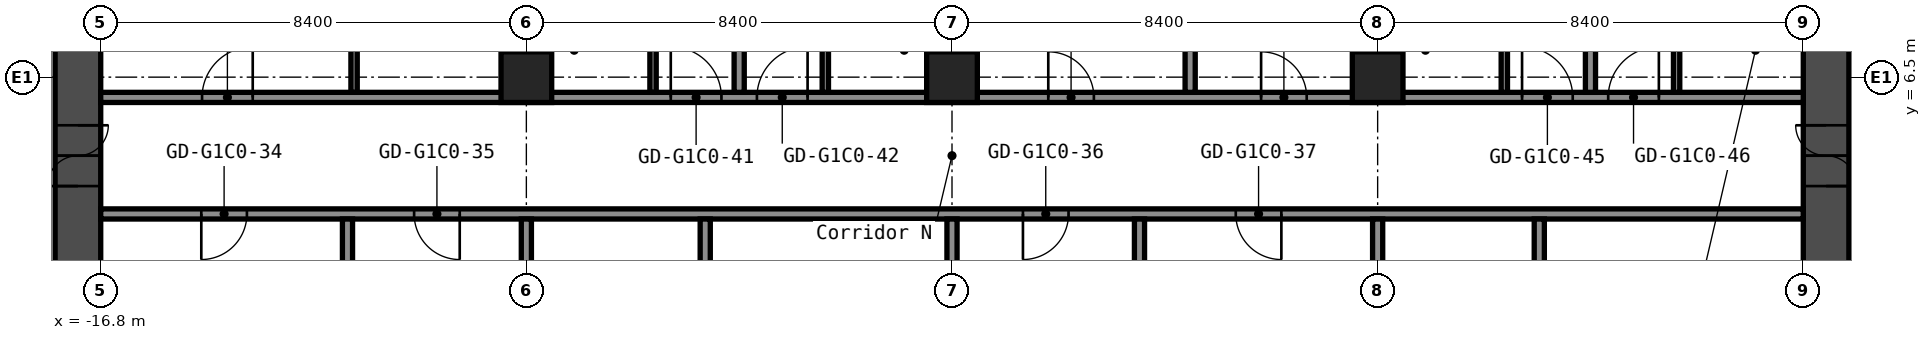
"""IFC4 building model, lengths in metres.
Left out: names, types, materials, properties, quantities, classifications, styles, units other than length and angle.
Written with IfcOpenShell. Run it as: python <this file> out.ifc"""

import sys

from ifc_helpers import new_model, si_unit, direction, frame, frame_2d, origin, origin_2d, place, context, subcontext, project, spatial, rectangle, hollow_rectangle, extrude, element, fill, save


model = new_model("IFC4")
c1 = context("Model", 3, precision=1e-05, world=origin(), true_north=direction((0.0, 1.0)))
c2 = subcontext(c1, "Body", "Model", "MODEL_VIEW")
j1 = project(units=[si_unit("LENGTHUNIT", "METRE"), si_unit("PLANEANGLEUNIT", "RADIAN")], contexts=[c1])
p1 = place(None, origin())
s1 = spatial("IfcSite", under=j1, at=p1, CompositionType="ELEMENT")
p2 = place(p1, origin())
s2 = spatial("IfcBuilding", under=s1, at=p2, CompositionType="ELEMENT")
p3 = place(p2, frame((0.0, 0.0, 26.2)))
s3 = spatial("IfcBuildingStorey", under=s2, at=p3, CompositionType="ELEMENT", Elevation=26.2)
for number, where, z_axis, x_axis in (
    (1, (-8.4, 6.5, 0.0), (0.0, 0.0, 1.0), (1.0, 0.0, 0.0)),
    (2, (0.0, 6.5, 0.0), (0.0, 0.0, 1.0), (1.0, 0.0, 0.0)),
    (3, (8.4, 6.5, 0.0), (0.0, 0.0, 1.0), (1.0, 0.0, 0.0)),
):
    element("IfcColumn", number, at=place(p3, frame(where, z_axis=z_axis, x_axis=x_axis)), inside=s3, PredefinedType="COLUMN", context=c2, shape_type="SweptSolid", body=[
        extrude(hollow_rectangle(XDim=1.0, YDim=1.0, WallThickness=0.04, at=origin_2d()), origin(), (0.0, 0.0, 1.0), 2.8),
    ])
p4 = place(p3, frame((-17.25, -8.4, 0.0), z_axis=(0.0, 0.0, 1.0), x_axis=(0.0, 1.0, 0.0)))
e4 = element("IfcWall", 4, at=p4, inside=s3, PredefinedType="SHEAR", context=c2, shape_type="SweptSolid", body=[
    extrude(rectangle(XDim=16.8, YDim=0.9, at=frame_2d((8.4, 0.0))), origin(), (0.0, 0.0, 1.0), 2.8),
])
p5 = place(p4, frame((12.75, 0.0, 0.0)))
e5 = element("IfcOpeningElement", 5, at=p5, cuts=e4, PredefinedType="OPENING", context=c2, shape_type="SweptSolid", body=[
    extrude(rectangle(XDim=1.2, YDim=2.1, at=frame_2d((0.6, 1.05))), frame((0.0, 0.46, 0.0), z_axis=(0.0, -1.0, 0.0), x_axis=(1.0, 0.0, 0.0)), (0.0, 0.0, 1.0), 0.92),
])
p6 = place(p4, frame((2.85, 0.0, 0.0)))
e6 = element("IfcOpeningElement", 6, at=p6, cuts=e4, PredefinedType="OPENING", context=c2, shape_type="SweptSolid", body=[
    extrude(rectangle(XDim=1.2, YDim=2.1, at=frame_2d((0.6, 1.05))), frame((0.0, 0.46, 0.0), z_axis=(0.0, -1.0, 0.0), x_axis=(1.0, 0.0, 0.0)), (0.0, 0.0, 1.0), 0.92),
])
p7 = place(p3, frame((17.25, -8.4, 0.0), z_axis=(0.0, 0.0, 1.0), x_axis=(0.0, 1.0, 0.0)))
e7 = element("IfcWall", 7, at=p7, inside=s3, PredefinedType="SHEAR", context=c2, shape_type="SweptSolid", body=[
    extrude(rectangle(XDim=16.8, YDim=0.9, at=frame_2d((8.4, 0.0))), origin(), (0.0, 0.0, 1.0), 2.8),
])
p8 = place(p7, frame((12.75, 0.0, 0.0)))
e8 = element("IfcOpeningElement", 8, at=p8, cuts=e7, PredefinedType="OPENING", context=c2, shape_type="SweptSolid", body=[
    extrude(rectangle(XDim=1.2, YDim=2.1, at=frame_2d((0.6, 1.05))), frame((0.0, 0.46, 0.0), z_axis=(0.0, -1.0, 0.0), x_axis=(1.0, 0.0, 0.0)), (0.0, 0.0, 1.0), 0.92),
])
p9 = place(p7, frame((2.85, 0.0, 0.0)))
e9 = element("IfcOpeningElement", 9, at=p9, cuts=e7, PredefinedType="OPENING", context=c2, shape_type="SweptSolid", body=[
    extrude(rectangle(XDim=1.2, YDim=2.1, at=frame_2d((0.6, 1.05))), frame((0.0, 0.46, 0.0), z_axis=(0.0, -1.0, 0.0), x_axis=(1.0, 0.0, 0.0)), (0.0, 0.0, 1.0), 0.92),
])
p10 = place(p3, frame((-16.8, 3.8, 0.0), z_axis=(0.0, 0.0, 1.0), x_axis=(1.0, 0.0, 0.0)))
e10 = element("IfcWall", 10, at=p10, inside=s3, PredefinedType="PARTITIONING", context=c2, shape_type="SweptSolid", body=[
    extrude(rectangle(XDim=33.6, YDim=0.2, at=frame_2d((16.8, 0.0))), origin(), (0.0, 0.0, 1.0), 2.8),
])
p11 = place(p10, frame((1.985, 0.0, 0.0)))
e11 = element("IfcOpeningElement", 11, at=p11, cuts=e10, PredefinedType="OPENING", context=c2, shape_type="SweptSolid", body=[
    extrude(rectangle(XDim=0.9, YDim=2.1, at=frame_2d((0.45, 1.05))), frame((0.0, 0.11, 0.0), z_axis=(0.0, -1.0, 0.0), x_axis=(1.0, 0.0, 0.0)), (0.0, 0.0, 1.0), 0.22),
])
p12 = place(p10, frame((6.185, 0.0, 0.0)))
e12 = element("IfcOpeningElement", 12, at=p12, cuts=e10, PredefinedType="OPENING", context=c2, shape_type="SweptSolid", body=[
    extrude(rectangle(XDim=0.9, YDim=2.1, at=frame_2d((0.45, 1.05))), frame((0.0, 0.11, 0.0), z_axis=(0.0, -1.0, 0.0), x_axis=(1.0, 0.0, 0.0)), (0.0, 0.0, 1.0), 0.22),
])
p13 = place(p10, frame((18.2, 0.0, 0.0)))
e13 = element("IfcOpeningElement", 13, at=p13, cuts=e10, PredefinedType="OPENING", context=c2, shape_type="SweptSolid", body=[
    extrude(rectangle(XDim=0.9, YDim=2.1, at=frame_2d((0.45, 1.05))), frame((0.0, 0.11, 0.0), z_axis=(0.0, -1.0, 0.0), x_axis=(1.0, 0.0, 0.0)), (0.0, 0.0, 1.0), 0.22),
])
p14 = place(p10, frame((22.4, 0.0, 0.0)))
e14 = element("IfcOpeningElement", 14, at=p14, cuts=e10, PredefinedType="OPENING", context=c2, shape_type="SweptSolid", body=[
    extrude(rectangle(XDim=0.9, YDim=2.1, at=frame_2d((0.45, 1.05))), frame((0.0, 0.11, 0.0), z_axis=(0.0, -1.0, 0.0), x_axis=(1.0, 0.0, 0.0)), (0.0, 0.0, 1.0), 0.22),
])
p15 = place(p3, frame((-16.8, 6.1, 0.0), z_axis=(0.0, 0.0, 1.0), x_axis=(1.0, 0.0, 0.0)))
e15 = element("IfcWall", 15, at=p15, inside=s3, PredefinedType="PARTITIONING", context=c2, shape_type="SweptSolid", body=[
    extrude(rectangle(XDim=33.6, YDim=0.2, at=frame_2d((16.8, 0.0))), origin(), (0.0, 0.0, 1.0), 2.8),
])
p16 = place(p15, frame((2.0, 0.0, 0.0)))
e16 = element("IfcOpeningElement", 16, at=p16, cuts=e15, PredefinedType="OPENING", context=c2, shape_type="SweptSolid", body=[
    extrude(rectangle(XDim=1.0, YDim=2.1, at=frame_2d((0.5, 1.05))), frame((0.0, 0.11, 0.0), z_axis=(0.0, -1.0, 0.0), x_axis=(1.0, 0.0, 0.0)), (0.0, 0.0, 1.0), 0.22),
])
p17 = place(p15, frame((11.25, 0.0, 0.0)))
e17 = element("IfcOpeningElement", 17, at=p17, cuts=e15, PredefinedType="OPENING", context=c2, shape_type="SweptSolid", body=[
    extrude(rectangle(XDim=1.0, YDim=2.1, at=frame_2d((0.5, 1.05))), frame((0.0, 0.11, 0.0), z_axis=(0.0, -1.0, 0.0), x_axis=(1.0, 0.0, 0.0)), (0.0, 0.0, 1.0), 0.22),
])
p18 = place(p15, frame((12.95, 0.0, 0.0)))
e18 = element("IfcOpeningElement", 18, at=p18, cuts=e15, PredefinedType="OPENING", context=c2, shape_type="SweptSolid", body=[
    extrude(rectangle(XDim=1.0, YDim=2.1, at=frame_2d((0.5, 1.05))), frame((0.0, 0.11, 0.0), z_axis=(0.0, -1.0, 0.0), x_axis=(1.0, 0.0, 0.0)), (0.0, 0.0, 1.0), 0.22),
])
p19 = place(p15, frame((18.7, 0.0, 0.0)))
e19 = element("IfcOpeningElement", 19, at=p19, cuts=e15, PredefinedType="OPENING", context=c2, shape_type="SweptSolid", body=[
    extrude(rectangle(XDim=0.9, YDim=2.1, at=frame_2d((0.45, 1.05))), frame((0.0, 0.11, 0.0), z_axis=(0.0, -1.0, 0.0), x_axis=(1.0, 0.0, 0.0)), (0.0, 0.0, 1.0), 0.22),
])
p20 = place(p15, frame((22.9, 0.0, 0.0)))
e20 = element("IfcOpeningElement", 20, at=p20, cuts=e15, PredefinedType="OPENING", context=c2, shape_type="SweptSolid", body=[
    extrude(rectangle(XDim=0.9, YDim=2.1, at=frame_2d((0.45, 1.05))), frame((0.0, 0.11, 0.0), z_axis=(0.0, -1.0, 0.0), x_axis=(1.0, 0.0, 0.0)), (0.0, 0.0, 1.0), 0.22),
])
p21 = place(p15, frame((28.05, 0.0, 0.0)))
e21 = element("IfcOpeningElement", 21, at=p21, cuts=e15, PredefinedType="OPENING", context=c2, shape_type="SweptSolid", body=[
    extrude(rectangle(XDim=1.0, YDim=2.1, at=frame_2d((0.5, 1.05))), frame((0.0, 0.11, 0.0), z_axis=(0.0, -1.0, 0.0), x_axis=(1.0, 0.0, 0.0)), (0.0, 0.0, 1.0), 0.22),
])
p22 = place(p15, frame((29.75, 0.0, 0.0)))
e22 = element("IfcOpeningElement", 22, at=p22, cuts=e15, PredefinedType="OPENING", context=c2, shape_type="SweptSolid", body=[
    extrude(rectangle(XDim=1.0, YDim=2.1, at=frame_2d((0.5, 1.05))), frame((0.0, 0.11, 0.0), z_axis=(0.0, -1.0, 0.0), x_axis=(1.0, 0.0, 0.0)), (0.0, 0.0, 1.0), 0.22),
])
p23 = place(p3, frame((-11.93, -3.7, 0.0), z_axis=(0.0, 0.0, 1.0), x_axis=(0.0, 1.0, 0.0)))
e23 = element("IfcWall", 23, at=p23, inside=s3, PredefinedType="PARTITIONING", context=c2, shape_type="SweptSolid", body=[
    extrude(rectangle(XDim=7.4, YDim=0.2, at=frame_2d((3.7, 0.0))), origin(), (0.0, 0.0, 1.0), 2.8),
])
p24 = place(p3, frame((-11.8, 6.2, 0.0), z_axis=(0.0, 0.0, 1.0), x_axis=(0.0, 1.0, 0.0)))
e24 = element("IfcWall", 24, at=p24, inside=s3, PredefinedType="PARTITIONING", context=c2, shape_type="SweptSolid", body=[
    extrude(rectangle(XDim=3.3, YDim=0.125, at=frame_2d((1.65, 0.0))), origin(), (0.0, 0.0, 1.0), 2.8),
])
p25 = place(p3, frame((-8.4, -3.7, 0.0), z_axis=(0.0, 0.0, 1.0), x_axis=(0.0, 1.0, 0.0)))
e25 = element("IfcWall", 25, at=p25, inside=s3, PredefinedType="PARTITIONING", context=c2, shape_type="SweptSolid", body=[
    extrude(rectangle(XDim=7.4, YDim=0.2, at=frame_2d((3.7, 0.0))), origin(), (0.0, 0.0, 1.0), 2.8),
])
p26 = place(p3, frame((-8.4, 6.99, 0.0), z_axis=(0.0, 0.0, 1.0), x_axis=(0.0, 1.0, 0.0)))
e26 = element("IfcWall", 26, at=p26, inside=s3, PredefinedType="PARTITIONING", context=c2, shape_type="SweptSolid", body=[
    extrude(rectangle(XDim=13.31, YDim=0.2, at=frame_2d((6.655, 0.0))), origin(), (0.0, 0.0, 1.0), 2.8),
])
p27 = place(p3, frame((-5.9, 6.2, 0.0), z_axis=(0.0, 0.0, 1.0), x_axis=(0.0, 1.0, 0.0)))
e27 = element("IfcWall", 27, at=p27, inside=s3, PredefinedType="PARTITIONING", context=c2, shape_type="SweptSolid", body=[
    extrude(rectangle(XDim=2.9, YDim=0.125, at=frame_2d((1.45, 0.0))), origin(), (0.0, 0.0, 1.0), 2.8),
])
p28 = place(p27, frame((1.5, 0.0, 0.0)))
e28 = element("IfcOpeningElement", 28, at=p28, cuts=e27, PredefinedType="OPENING", context=c2, shape_type="SweptSolid", body=[
    extrude(rectangle(XDim=0.8, YDim=2.1, at=frame_2d((0.4, 1.05))), frame((0.0, 0.073, 0.0), z_axis=(0.0, -1.0, 0.0), x_axis=(1.0, 0.0, 0.0)), (0.0, 0.0, 1.0), 0.145),
])
p29 = place(p3, frame((-4.87, -3.7, 0.0), z_axis=(0.0, 0.0, 1.0), x_axis=(0.0, 1.0, 0.0)))
e29 = element("IfcWall", 29, at=p29, inside=s3, PredefinedType="PARTITIONING", context=c2, shape_type="SweptSolid", body=[
    extrude(rectangle(XDim=7.4, YDim=0.2, at=frame_2d((3.7, 0.0))), origin(), (0.0, 0.0, 1.0), 2.8),
])
p30 = place(p3, frame((-4.2, 6.2, 0.0), z_axis=(0.0, 0.0, 1.0), x_axis=(0.0, 1.0, 0.0)))
e30 = element("IfcWall", 30, at=p30, inside=s3, PredefinedType="PARTITIONING", context=c2, shape_type="SweptSolid", body=[
    extrude(rectangle(XDim=14.1, YDim=0.2, at=frame_2d((7.05, 0.0))), origin(), (0.0, 0.0, 1.0), 2.8),
])
p31 = place(p3, frame((-2.5, 6.2, 0.0), z_axis=(0.0, 0.0, 1.0), x_axis=(0.0, 1.0, 0.0)))
e31 = element("IfcWall", 31, at=p31, inside=s3, PredefinedType="PARTITIONING", context=c2, shape_type="SweptSolid", body=[
    extrude(rectangle(XDim=2.9, YDim=0.125, at=frame_2d((1.45, 0.0))), origin(), (0.0, 0.0, 1.0), 2.8),
])
p32 = place(p31, frame((1.5, 0.0, 0.0)))
e32 = element("IfcOpeningElement", 32, at=p32, cuts=e31, PredefinedType="OPENING", context=c2, shape_type="SweptSolid", body=[
    extrude(rectangle(XDim=0.8, YDim=2.1, at=frame_2d((0.4, 1.05))), frame((0.0, 0.073, 0.0), z_axis=(0.0, -1.0, 0.0), x_axis=(1.0, 0.0, 0.0)), (0.0, 0.0, 1.0), 0.145),
])
p33 = place(p3, frame((0.0, -3.7, 0.0), z_axis=(0.0, 0.0, 1.0), x_axis=(0.0, 1.0, 0.0)))
e33 = element("IfcWall", 33, at=p33, inside=s3, PredefinedType="PARTITIONING", context=c2, shape_type="SweptSolid", body=[
    extrude(rectangle(XDim=7.4, YDim=0.2, at=frame_2d((3.7, 0.0))), origin(), (0.0, 0.0, 1.0), 2.8),
])
p34 = place(p3, frame((0.0, 6.99, 0.0), z_axis=(0.0, 0.0, 1.0), x_axis=(0.0, 1.0, 0.0)))
e34 = element("IfcWall", 34, at=p34, inside=s3, PredefinedType="PARTITIONING", context=c2, shape_type="SweptSolid", body=[
    extrude(rectangle(XDim=13.31, YDim=0.2, at=frame_2d((6.655, 0.0))), origin(), (0.0, 0.0, 1.0), 2.8),
])
p35 = place(p3, frame((3.7, -3.7, 0.0), z_axis=(0.0, 0.0, 1.0), x_axis=(0.0, 1.0, 0.0)))
e35 = element("IfcWall", 35, at=p35, inside=s3, PredefinedType="PARTITIONING", context=c2, shape_type="SweptSolid", body=[
    extrude(rectangle(XDim=7.4, YDim=0.2, at=frame_2d((3.7, 0.0))), origin(), (0.0, 0.0, 1.0), 2.8),
])
p36 = place(p3, frame((4.7, 6.2, 0.0), z_axis=(0.0, 0.0, 1.0), x_axis=(0.0, 1.0, 0.0)))
e36 = element("IfcWall", 36, at=p36, inside=s3, PredefinedType="PARTITIONING", context=c2, shape_type="SweptSolid", body=[
    extrude(rectangle(XDim=14.1, YDim=0.2, at=frame_2d((7.05, 0.0))), origin(), (0.0, 0.0, 1.0), 2.8),
])
p37 = place(p3, frame((8.4, -3.7, 0.0), z_axis=(0.0, 0.0, 1.0), x_axis=(0.0, 1.0, 0.0)))
e37 = element("IfcWall", 37, at=p37, inside=s3, PredefinedType="PARTITIONING", context=c2, shape_type="SweptSolid", body=[
    extrude(rectangle(XDim=7.4, YDim=0.2, at=frame_2d((3.7, 0.0))), origin(), (0.0, 0.0, 1.0), 2.8),
])
p38 = place(p3, frame((8.4, 6.99, 0.0), z_axis=(0.0, 0.0, 1.0), x_axis=(0.0, 1.0, 0.0)))
e38 = element("IfcWall", 38, at=p38, inside=s3, PredefinedType="PARTITIONING", context=c2, shape_type="SweptSolid", body=[
    extrude(rectangle(XDim=13.31, YDim=0.2, at=frame_2d((6.655, 0.0))), origin(), (0.0, 0.0, 1.0), 2.8),
])
p39 = place(p3, frame((10.9, 6.2, 0.0), z_axis=(0.0, 0.0, 1.0), x_axis=(0.0, 1.0, 0.0)))
e39 = element("IfcWall", 39, at=p39, inside=s3, PredefinedType="PARTITIONING", context=c2, shape_type="SweptSolid", body=[
    extrude(rectangle(XDim=2.9, YDim=0.125, at=frame_2d((1.45, 0.0))), origin(), (0.0, 0.0, 1.0), 2.8),
])
p40 = place(p39, frame((1.5, 0.0, 0.0)))
e40 = element("IfcOpeningElement", 40, at=p40, cuts=e39, PredefinedType="OPENING", context=c2, shape_type="SweptSolid", body=[
    extrude(rectangle(XDim=0.8, YDim=2.1, at=frame_2d((0.4, 1.05))), frame((0.0, 0.073, 0.0), z_axis=(0.0, -1.0, 0.0), x_axis=(1.0, 0.0, 0.0)), (0.0, 0.0, 1.0), 0.145),
])
p41 = place(p3, frame((11.59, -3.7, 0.0), z_axis=(0.0, 0.0, 1.0), x_axis=(0.0, 1.0, 0.0)))
e41 = element("IfcWall", 41, at=p41, inside=s3, PredefinedType="PARTITIONING", context=c2, shape_type="SweptSolid", body=[
    extrude(rectangle(XDim=7.4, YDim=0.2, at=frame_2d((3.7, 0.0))), origin(), (0.0, 0.0, 1.0), 2.8),
])
p42 = place(p3, frame((12.6, 6.2, 0.0), z_axis=(0.0, 0.0, 1.0), x_axis=(0.0, 1.0, 0.0)))
e42 = element("IfcWall", 42, at=p42, inside=s3, PredefinedType="PARTITIONING", context=c2, shape_type="SweptSolid", body=[
    extrude(rectangle(XDim=14.1, YDim=0.2, at=frame_2d((7.05, 0.0))), origin(), (0.0, 0.0, 1.0), 2.8),
])
p43 = place(p3, frame((14.3, 6.2, 0.0), z_axis=(0.0, 0.0, 1.0), x_axis=(0.0, 1.0, 0.0)))
e43 = element("IfcWall", 43, at=p43, inside=s3, PredefinedType="PARTITIONING", context=c2, shape_type="SweptSolid", body=[
    extrude(rectangle(XDim=2.9, YDim=0.125, at=frame_2d((1.45, 0.0))), origin(), (0.0, 0.0, 1.0), 2.8),
])
p44 = place(p43, frame((1.5, 0.0, 0.0)))
e44 = element("IfcOpeningElement", 44, at=p44, cuts=e43, PredefinedType="OPENING", context=c2, shape_type="SweptSolid", body=[
    extrude(rectangle(XDim=0.8, YDim=2.1, at=frame_2d((0.4, 1.05))), frame((0.0, 0.073, 0.0), z_axis=(0.0, -1.0, 0.0), x_axis=(1.0, 0.0, 0.0)), (0.0, 0.0, 1.0), 0.145),
])
p45 = place(p5, origin())
e45 = element("IfcDoor", 45, at=p45, inside=s3, OperationType="DOUBLE_DOOR_SINGLE_SWING", PredefinedType="DOOR", context=c2, shape_type="SweptSolid", body=[
    extrude(rectangle(XDim=1.2, YDim=2.1, at=frame_2d((0.6, 1.05))), frame((0.0, 0.025, 0.0), z_axis=(0.0, -1.0, 0.0), x_axis=(1.0, 0.0, 0.0)), (0.0, 0.0, 1.0), 0.05),
])
fill(e5, e45)
p46 = place(p8, origin())
e46 = element("IfcDoor", 46, at=p46, inside=s3, OperationType="DOUBLE_DOOR_SINGLE_SWING", PredefinedType="DOOR", context=c2, shape_type="SweptSolid", body=[
    extrude(rectangle(XDim=1.2, YDim=2.1, at=frame_2d((0.6, 1.05))), frame((0.0, 0.025, 0.0), z_axis=(0.0, -1.0, 0.0), x_axis=(1.0, 0.0, 0.0)), (0.0, 0.0, 1.0), 0.05),
])
fill(e8, e46)
p47 = place(p11, origin())
e47 = element("IfcDoor", 47, at=p47, inside=s3, OperationType="SINGLE_SWING_LEFT", PredefinedType="DOOR", context=c2, shape_type="SweptSolid", body=[
    extrude(rectangle(XDim=0.9, YDim=2.1, at=frame_2d((0.45, 1.05))), frame((0.0, 0.025, 0.0), z_axis=(0.0, -1.0, 0.0), x_axis=(1.0, 0.0, 0.0)), (0.0, 0.0, 1.0), 0.05),
])
fill(e11, e47)
p48 = place(p12, origin())
e48 = element("IfcDoor", 48, at=p48, inside=s3, OperationType="SINGLE_SWING_RIGHT", PredefinedType="DOOR", context=c2, shape_type="SweptSolid", body=[
    extrude(rectangle(XDim=0.9, YDim=2.1, at=frame_2d((0.45, 1.05))), frame((0.0, 0.025, 0.0), z_axis=(0.0, -1.0, 0.0), x_axis=(1.0, 0.0, 0.0)), (0.0, 0.0, 1.0), 0.05),
])
fill(e12, e48)
p49 = place(p13, origin())
e49 = element("IfcDoor", 49, at=p49, inside=s3, OperationType="SINGLE_SWING_LEFT", PredefinedType="DOOR", context=c2, shape_type="SweptSolid", body=[
    extrude(rectangle(XDim=0.9, YDim=2.1, at=frame_2d((0.45, 1.05))), frame((0.0, 0.025, 0.0), z_axis=(0.0, -1.0, 0.0), x_axis=(1.0, 0.0, 0.0)), (0.0, 0.0, 1.0), 0.05),
])
fill(e13, e49)
p50 = place(p14, origin())
e50 = element("IfcDoor", 50, at=p50, inside=s3, OperationType="SINGLE_SWING_RIGHT", PredefinedType="DOOR", context=c2, shape_type="SweptSolid", body=[
    extrude(rectangle(XDim=0.9, YDim=2.1, at=frame_2d((0.45, 1.05))), frame((0.0, 0.025, 0.0), z_axis=(0.0, -1.0, 0.0), x_axis=(1.0, 0.0, 0.0)), (0.0, 0.0, 1.0), 0.05),
])
fill(e14, e50)
p51 = place(p16, origin())
e51 = element("IfcDoor", 51, at=p51, inside=s3, OperationType="SINGLE_SWING_LEFT", PredefinedType="DOOR", context=c2, shape_type="SweptSolid", body=[
    extrude(rectangle(XDim=1.0, YDim=2.1, at=frame_2d((0.5, 1.05))), frame((0.0, 0.025, 0.0), z_axis=(0.0, -1.0, 0.0), x_axis=(1.0, 0.0, 0.0)), (0.0, 0.0, 1.0), 0.05),
])
fill(e16, e51)
p52 = place(p17, origin())
e52 = element("IfcDoor", 52, at=p52, inside=s3, OperationType="SINGLE_SWING_RIGHT", PredefinedType="DOOR", context=c2, shape_type="SweptSolid", body=[
    extrude(rectangle(XDim=1.0, YDim=2.1, at=frame_2d((0.5, 1.05))), frame((0.0, 0.025, 0.0), z_axis=(0.0, -1.0, 0.0), x_axis=(1.0, 0.0, 0.0)), (0.0, 0.0, 1.0), 0.05),
])
fill(e17, e52)
p53 = place(p18, origin())
e53 = element("IfcDoor", 53, at=p53, inside=s3, OperationType="SINGLE_SWING_LEFT", PredefinedType="DOOR", context=c2, shape_type="SweptSolid", body=[
    extrude(rectangle(XDim=1.0, YDim=2.1, at=frame_2d((0.5, 1.05))), frame((0.0, 0.025, 0.0), z_axis=(0.0, -1.0, 0.0), x_axis=(1.0, 0.0, 0.0)), (0.0, 0.0, 1.0), 0.05),
])
fill(e18, e53)
p54 = place(p19, origin())
e54 = element("IfcDoor", 54, at=p54, inside=s3, OperationType="SINGLE_SWING_RIGHT", PredefinedType="DOOR", context=c2, shape_type="SweptSolid", body=[
    extrude(rectangle(XDim=0.9, YDim=2.1, at=frame_2d((0.45, 1.05))), frame((0.0, 0.025, 0.0), z_axis=(0.0, -1.0, 0.0), x_axis=(1.0, 0.0, 0.0)), (0.0, 0.0, 1.0), 0.05),
])
fill(e19, e54)
p55 = place(p20, origin())
e55 = element("IfcDoor", 55, at=p55, inside=s3, OperationType="SINGLE_SWING_RIGHT", PredefinedType="DOOR", context=c2, shape_type="SweptSolid", body=[
    extrude(rectangle(XDim=0.9, YDim=2.1, at=frame_2d((0.45, 1.05))), frame((0.0, 0.025, 0.0), z_axis=(0.0, -1.0, 0.0), x_axis=(1.0, 0.0, 0.0)), (0.0, 0.0, 1.0), 0.05),
])
fill(e20, e55)
p56 = place(p21, origin())
e56 = element("IfcDoor", 56, at=p56, inside=s3, OperationType="SINGLE_SWING_RIGHT", PredefinedType="DOOR", context=c2, shape_type="SweptSolid", body=[
    extrude(rectangle(XDim=1.0, YDim=2.1, at=frame_2d((0.5, 1.05))), frame((0.0, 0.025, 0.0), z_axis=(0.0, -1.0, 0.0), x_axis=(1.0, 0.0, 0.0)), (0.0, 0.0, 1.0), 0.05),
])
fill(e21, e56)
p57 = place(p22, origin())
e57 = element("IfcDoor", 57, at=p57, inside=s3, OperationType="SINGLE_SWING_LEFT", PredefinedType="DOOR", context=c2, shape_type="SweptSolid", body=[
    extrude(rectangle(XDim=1.0, YDim=2.1, at=frame_2d((0.5, 1.05))), frame((0.0, 0.025, 0.0), z_axis=(0.0, -1.0, 0.0), x_axis=(1.0, 0.0, 0.0)), (0.0, 0.0, 1.0), 0.05),
])
fill(e22, e57)
save(model, sys.argv[1])
